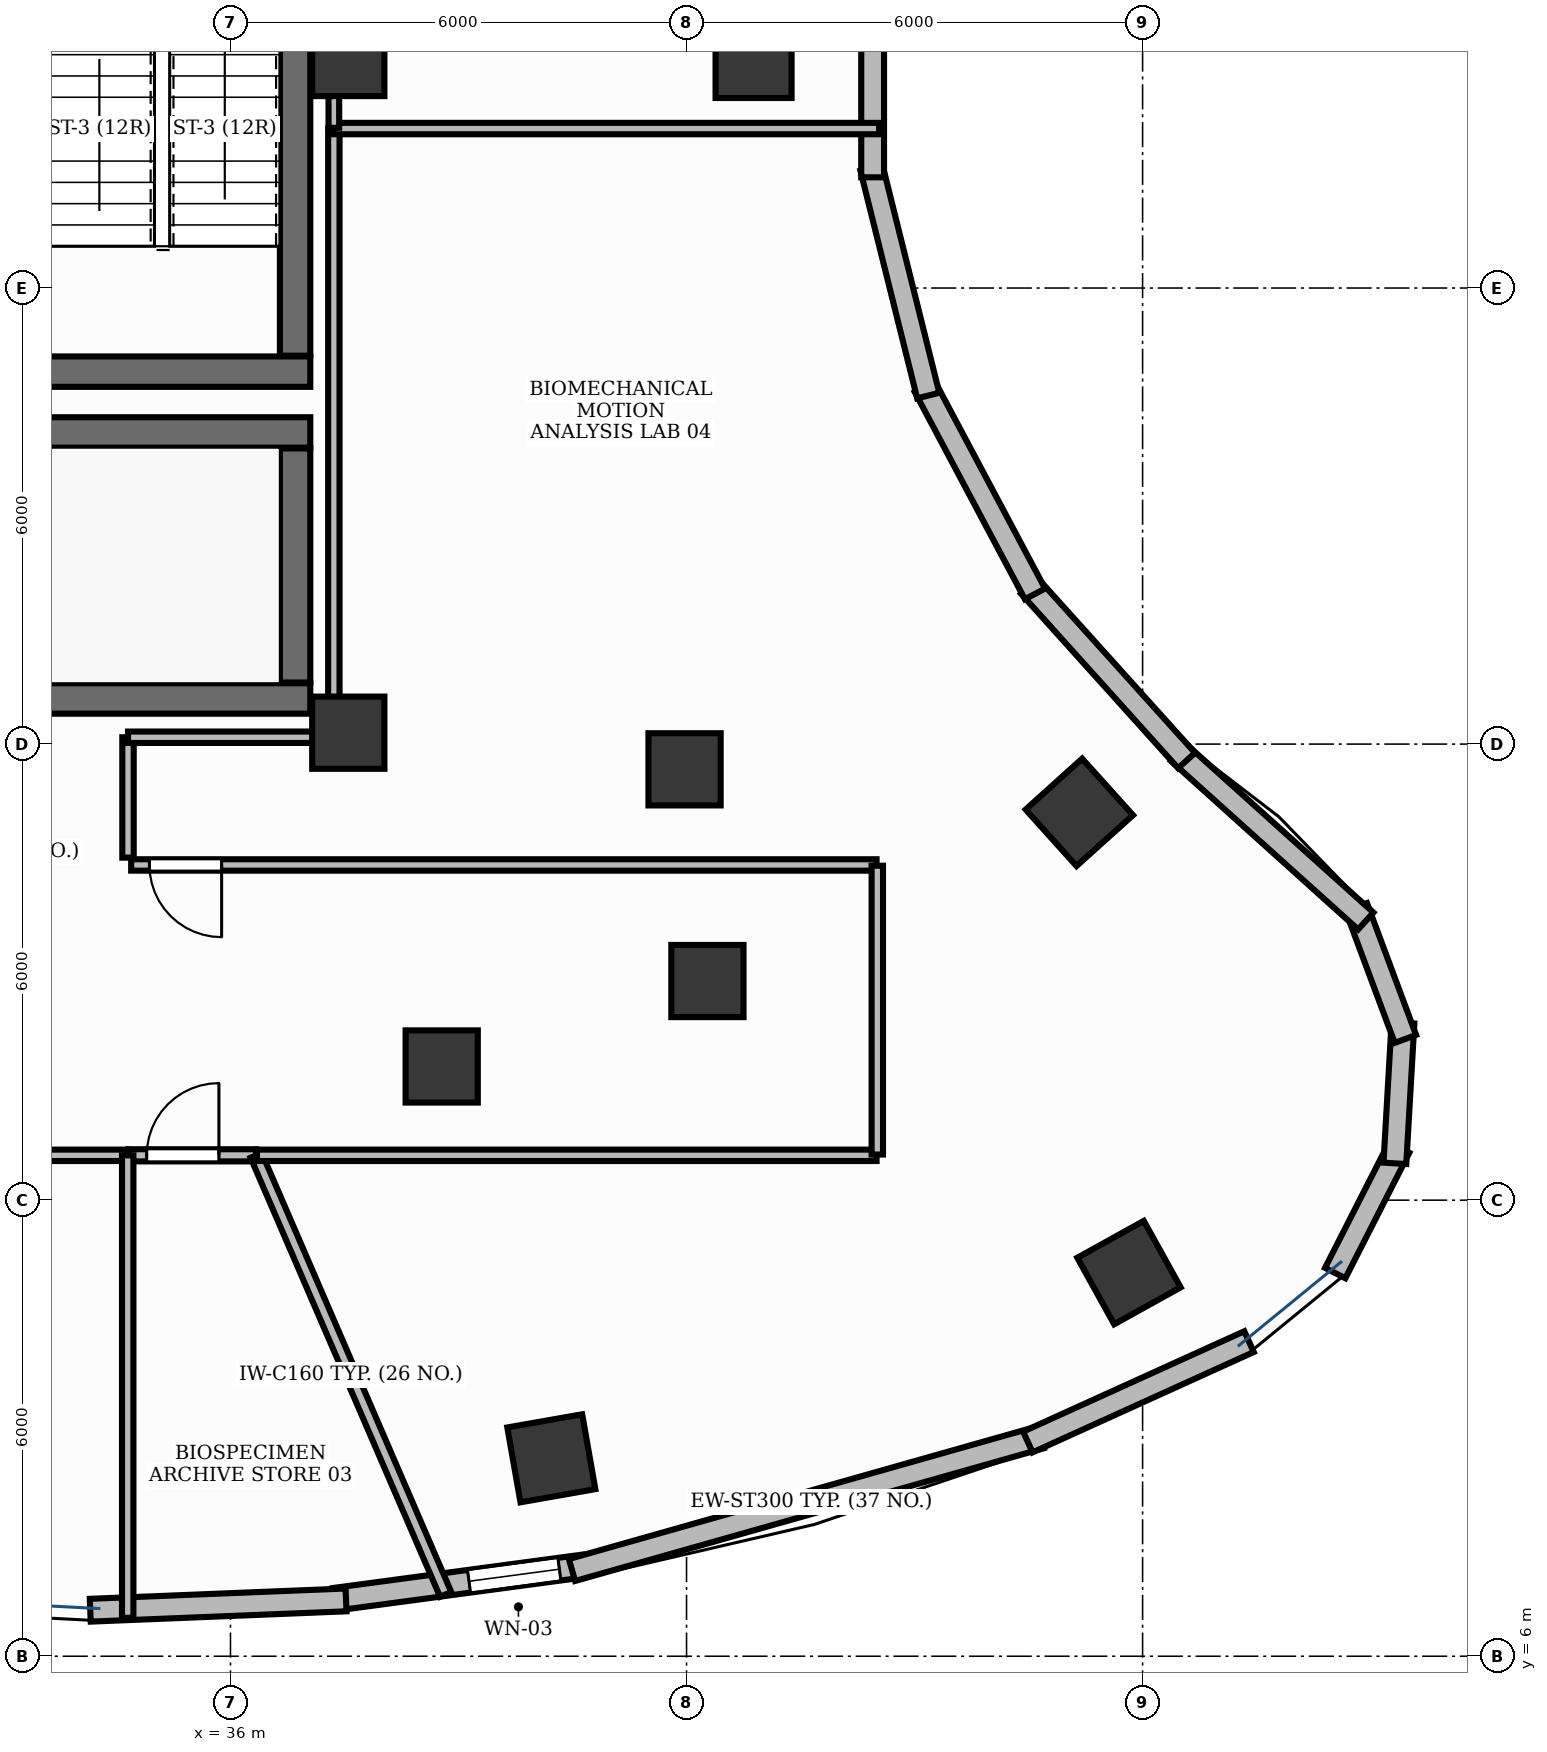
"""IFC4 building model, lengths in metres.
Left out: names, types, materials, properties, quantities, classifications, styles, units other than length and angle.
Written with IfcOpenShell. Run it as: python <this file> out.ifc"""

import sys

from ifc_helpers import new_model, si_unit, direction, frame, frame_2d, origin, origin_2d, place, context, subcontext, project, spatial, rectangle, extrude, element, fill, save


model = new_model("IFC4")
c1 = context("Model", 3, precision=1e-05, world=origin(), true_north=direction((0.0, 1.0)))
c2 = subcontext(c1, "Body", "Model", "MODEL_VIEW")
j1 = project(units=[si_unit("LENGTHUNIT", "METRE"), si_unit("PLANEANGLEUNIT", "RADIAN")], contexts=[c1])
p1 = place(None, origin())
s1 = spatial("IfcSite", under=j1, at=p1, CompositionType="ELEMENT")
p2 = place(p1, origin())
s2 = spatial("IfcBuilding", under=s1, at=p2, CompositionType="ELEMENT")
p3 = place(p2, frame((0.0, 0.0, 171.0)))
s3 = spatial("IfcBuildingStorey", under=s2, at=p3, CompositionType="ELEMENT", Elevation=171.0)
p4 = place(p3, frame((28.852, 18.6, 0.0), z_axis=(0.0, 0.0, 1.0), x_axis=(1.0, 0.0, 0.0)))
e1 = element("IfcWall", 1, at=p4, inside=s3, PredefinedType="SHEAR", context=c2, shape_type="SweptSolid", body=[
    extrude(rectangle(XDim=8.198, YDim=0.4, at=frame_2d((4.099, 0.0))), origin(), (0.0, 0.0, 1.0), 3.9),
])
p5 = place(p3, frame((28.4, 22.1, 0.0), z_axis=(0.0, 0.0, 1.0), x_axis=(1.0, 0.0, 0.0)))
e2 = element("IfcWall", 2, at=p5, inside=s3, PredefinedType="SHEAR", context=c2, shape_type="SweptSolid", body=[
    extrude(rectangle(XDim=8.65, YDim=0.4, at=frame_2d((4.325, 0.0))), origin(), (0.0, 0.0, 1.0), 3.9),
])
p6 = place(p3, frame((36.85, 18.81, 0.0), z_axis=(0.0, 0.0, 1.0), x_axis=(0.0, 1.0, 0.0)))
e3 = element("IfcWall", 3, at=p6, inside=s3, PredefinedType="SHEAR", context=c2, shape_type="SweptSolid", body=[
    extrude(rectangle(XDim=3.08, YDim=0.4, at=frame_2d((1.54, 0.0))), origin(), (0.0, 0.0, 1.0), 3.9),
])
p7 = place(p3, frame((33.15, 22.9, 0.0), z_axis=(0.0, 0.0, 1.0), x_axis=(1.0, 0.0, 0.0)))
e4 = element("IfcWall", 4, at=p7, inside=s3, PredefinedType="SHEAR", context=c2, shape_type="SweptSolid", body=[
    extrude(rectangle(XDim=3.9, YDim=0.4, at=frame_2d((1.95, 0.0))), origin(), (0.0, 0.0, 1.0), 3.9),
])
p8 = place(p3, frame((36.85, 23.11, 0.0), z_axis=(0.0, 0.0, 1.0), x_axis=(0.0, 1.0, 0.0)))
e5 = element("IfcWall", 5, at=p8, inside=s3, PredefinedType="SHEAR", context=c2, shape_type="SweptSolid", body=[
    extrude(rectangle(XDim=7.78, YDim=0.4, at=frame_2d((3.89, 0.0))), origin(), (0.0, 0.0, 1.0), 3.9),
])
for number, where, z_axis, x_axis in (
    (6, (37.55, 18.15, -0.0), (0.0, 0.0, 1.0), (1.0, 0.0, 0.0)),
    (7, (37.55, 27.0, -0.0), (0.0, 0.0, 1.0), (1.0, 0.0, 0.0)),
):
    element("IfcColumn", number, at=place(p3, frame(where, z_axis=z_axis, x_axis=x_axis)), inside=s3, PredefinedType="PILASTER", context=c2, shape_type="SweptSolid", body=[
        extrude(rectangle(XDim=0.95, YDim=0.95, at=origin_2d()), origin(), (0.0, 0.0, 1.0), 3.901),
    ])
p9 = place(p3, frame((40.221, 8.604, -0.0), z_axis=(0.0, 0.0, 1.0), x_axis=(0.984868307662, 0.173304404339, 0.0)))
e8 = element("IfcColumn", 8, at=p9, inside=s3, PredefinedType="COLUMN", context=c2, shape_type="SweptSolid", body=[
    extrude(rectangle(XDim=1.0, YDim=1.0, at=origin_2d()), origin(), (0.0, 0.0, 1.0), 3.901),
])
p10 = place(p3, frame((38.779, 13.759, -0.0), z_axis=(0.0, 0.0, 1.0), x_axis=(1.0, 0.0, 0.0)))
e9 = element("IfcColumn", 9, at=p10, inside=s3, PredefinedType="COLUMN", context=c2, shape_type="SweptSolid", body=[
    extrude(rectangle(XDim=0.95, YDim=0.95, at=origin_2d()), origin(), (0.0, 0.0, 1.0), 3.901),
])
p11 = place(p3, frame((47.821, 11.047, -0.0), z_axis=(0.0, 0.0, 1.0), x_axis=(0.874535078577, 0.484962262797, 0.0)))
e10 = element("IfcColumn", 10, at=p11, inside=s3, PredefinedType="COLUMN", context=c2, shape_type="SweptSolid", body=[
    extrude(rectangle(XDim=1.0, YDim=1.0, at=origin_2d()), origin(), (0.0, 0.0, 1.0), 3.901),
])
p12 = place(p3, frame((42.275, 14.883, -0.0), z_axis=(0.0, 0.0, 1.0), x_axis=(1.0, 0.0, 0.0)))
e11 = element("IfcColumn", 11, at=p12, inside=s3, PredefinedType="COLUMN", context=c2, shape_type="SweptSolid", body=[
    extrude(rectangle(XDim=0.95, YDim=0.95, at=origin_2d()), origin(), (0.0, 0.0, 1.0), 3.901),
])
p13 = place(p3, frame((47.167, 17.102, -0.0), z_axis=(0.0, 0.0, 1.0), x_axis=(-0.669130606359, 0.743144825477, 0.0)))
e12 = element("IfcColumn", 12, at=p13, inside=s3, PredefinedType="COLUMN", context=c2, shape_type="SweptSolid", body=[
    extrude(rectangle(XDim=1.0, YDim=1.0, at=origin_2d()), origin(), (0.0, 0.0, 1.0), 3.901),
])
p14 = place(p3, frame((41.974, 17.668, -0.0), z_axis=(0.0, 0.0, 1.0), x_axis=(1.0, 0.0, 0.0)))
e13 = element("IfcColumn", 13, at=p14, inside=s3, PredefinedType="COLUMN", context=c2, shape_type="SweptSolid", body=[
    extrude(rectangle(XDim=0.95, YDim=0.95, at=origin_2d()), origin(), (0.0, 0.0, 1.0), 3.901),
])
p15 = place(p3, frame((42.882, 27.0, -0.0), z_axis=(0.0, 0.0, 1.0), x_axis=(0.0, 1.0, 0.0)))
e14 = element("IfcColumn", 14, at=p15, inside=s3, PredefinedType="COLUMN", context=c2, shape_type="SweptSolid", body=[
    extrude(rectangle(XDim=1.0, YDim=1.0, at=origin_2d()), origin(), (0.0, 0.0, 1.0), 3.901),
])
p16 = place(p3, frame((37.365, 6.748, 0.0), z_axis=(0.0, 0.0, 1.0), x_axis=(0.991139436205, 0.132825517122, 0.0)))
e15 = element("IfcWall", 15, at=p16, inside=s3, PredefinedType="STANDARD", context=c2, shape_type="SweptSolid", body=[
    extrude(rectangle(XDim=3.31, YDim=0.3, at=frame_2d((1.655, 0.0))), origin(), (0.0, 0.0, 1.0), 3.9),
])
p17 = place(p16, frame((1.789, 0.0, 0.9)))
e16 = element("IfcOpeningElement", 16, at=p17, cuts=e15, PredefinedType="OPENING", context=c2, shape_type="SweptSolid", body=[
    extrude(rectangle(XDim=1.2, YDim=2.7, at=frame_2d((0.6, 1.35))), frame((0.0, 0.165, 0.0), z_axis=(0.0, -1.0, 0.0), x_axis=(1.0, 0.0, 0.0)), (0.0, 0.0, 1.0), 0.33),
])
p18 = place(p3, frame((34.155, 6.605, 0.0), z_axis=(0.0, 0.0, 1.0), x_axis=(0.999190386434, 0.040231475948, 0.0)))
e17 = element("IfcWall", 17, at=p18, inside=s3, PredefinedType="STANDARD", context=c2, shape_type="SweptSolid", body=[
    extrude(rectangle(XDim=3.368, YDim=0.3, at=frame_2d((1.684, 0.0))), origin(), (0.0, 0.0, 1.0), 3.9),
])
p19 = place(p3, frame((40.493, 7.134, 0.0), z_axis=(0.0, 0.0, 1.0), x_axis=(0.962163849422, 0.272471515694, 0.0)))
e18 = element("IfcWall", 18, at=p19, inside=s3, PredefinedType="STANDARD", context=c2, shape_type="SweptSolid", body=[
    extrude(rectangle(XDim=6.409, YDim=0.3, at=frame_2d((3.205, 0.0))), origin(), (0.0, 0.0, 1.0), 3.9),
])
p20 = place(p3, frame((46.49, 8.818, 0.0), z_axis=(0.0, 0.0, 1.0), x_axis=(0.910633193525, 0.413215666268, 0.0)))
e19 = element("IfcWall", 19, at=p20, inside=s3, PredefinedType="STANDARD", context=c2, shape_type="SweptSolid", body=[
    extrude(rectangle(XDim=3.195, YDim=0.3, at=frame_2d((1.598, 0.0))), origin(), (0.0, 0.0, 1.0), 3.9),
])
for number, where, z_axis, x_axis in (
    (20, (50.534, 11.041, 0.0), (0.0, 0.0, 1.0), (0.454, 0.891, 0.0)),
    (21, (51.319, 12.484, 0.0), (0.0, 0.0, 1.0), (0.057, 0.998, 0.0)),
    (22, (51.458, 14.121, 0.0), (0.0, 0.0, 1.0), (-0.349, 0.937, 0.0)),
):
    element("IfcWall", number, at=place(p3, frame(where, z_axis=z_axis, x_axis=x_axis)), inside=s3, PredefinedType="STANDARD", context=c2, shape_type="SweptSolid", body=[
        extrude(rectangle(XDim=1.852, YDim=0.3, at=frame_2d((0.926, 0.0))), origin(), (0.0, 0.0, 1.0), 3.9),
    ])
p21 = place(p3, frame((50.936, 15.673, 0.0), z_axis=(0.0, 0.0, 1.0), x_axis=(-0.743341827472, 0.668911748687, 0.0)))
e23 = element("IfcWall", 23, at=p21, inside=s3, PredefinedType="STANDARD", context=c2, shape_type="SweptSolid", body=[
    extrude(rectangle(XDim=3.31, YDim=0.3, at=frame_2d((1.655, 0.0))), origin(), (0.0, 0.0, 1.0), 3.9),
])
for number, where, z_axis, x_axis in (
    (24, (48.579, 17.784, 0.0), (0.0, 0.0, 1.0), (-0.669, 0.743, 0.0)),
    (25, (46.584, 19.976, 0.0), (0.0, 0.0, 1.0), (-0.469, 0.883, 0.0)),
    (26, (45.18, 22.585, 0.0), (0.0, 0.0, 1.0), (-0.242, 0.97, 0.0)),
    (27, (44.448, 25.457, 0.0), (0.0, 0.0, 1.0), (0.0, 1.0, 0.0)),
):
    element("IfcWall", number, at=place(p3, frame(where, z_axis=z_axis, x_axis=x_axis)), inside=s3, PredefinedType="STANDARD", context=c2, shape_type="SweptSolid", body=[
        extrude(rectangle(XDim=3.087, YDim=0.3, at=frame_2d((1.543, 0.0))), origin(), (0.0, 0.0, 1.0), 3.9),
    ])
p22 = place(p3, frame((19.85, 12.59, 0.0), z_axis=(0.0, 0.0, 1.0), x_axis=(1.0, 0.0, 0.0)))
e28 = element("IfcWall", 28, at=p22, inside=s3, PredefinedType="PARTITIONING", context=c2, shape_type="SweptSolid", body=[
    extrude(rectangle(XDim=14.798, YDim=0.15, at=frame_2d((7.399, 0.0))), origin(), (0.0, 0.0, 1.0), 2.91),
])
p23 = place(p22, frame((4.809, 0.0, 0.0)))
e29 = element("IfcOpeningElement", 29, at=p23, cuts=e28, PredefinedType="OPENING", context=c2, shape_type="SweptSolid", body=[
    extrude(rectangle(XDim=0.95, YDim=2.15, at=frame_2d((0.475, 1.075))), frame((0.0, 0.09, 0.0), z_axis=(0.0, -1.0, 0.0), x_axis=(1.0, 0.0, 0.0)), (0.0, 0.0, 1.0), 0.18),
])
p24 = place(p3, frame((34.658, 12.59, 0.0), z_axis=(0.0, 0.0, 1.0), x_axis=(1.0, 0.0, 0.0)))
e30 = element("IfcWall", 30, at=p24, inside=s3, PredefinedType="PARTITIONING", context=c2, shape_type="SweptSolid", body=[
    extrude(rectangle(XDim=1.68, YDim=0.16, at=frame_2d((0.84, 0.0))), origin(), (0.0, 0.0, 1.0), 2.91),
])
p25 = place(p24, frame((0.24, 0.0, 0.0)))
e31 = element("IfcOpeningElement", 31, at=p25, cuts=e30, PredefinedType="OPENING", context=c2, shape_type="SweptSolid", body=[
    extrude(rectangle(XDim=0.95, YDim=2.15, at=frame_2d((0.475, 1.075))), frame((0.0, 0.095, 0.0), z_axis=(0.0, -1.0, 0.0), x_axis=(1.0, 0.0, 0.0)), (0.0, 0.0, 1.0), 0.19),
])
p26 = place(p3, frame((44.5, 16.41, 0.0), z_axis=(0.0, 0.0, 1.0), x_axis=(-1.0, 0.0, 0.0)))
e32 = element("IfcWall", 32, at=p26, inside=s3, PredefinedType="PARTITIONING", context=c2, shape_type="SweptSolid", body=[
    extrude(rectangle(XDim=9.806, YDim=0.15, at=frame_2d((4.903, 0.0))), origin(), (0.0, 0.0, 1.0), 2.91),
])
p27 = place(p26, frame((8.616, 0.0, 0.0)))
e33 = element("IfcOpeningElement", 33, at=p27, cuts=e32, PredefinedType="OPENING", context=c2, shape_type="SweptSolid", body=[
    extrude(rectangle(XDim=0.95, YDim=2.15, at=frame_2d((0.475, 1.075))), frame((0.0, 0.09, 0.0), z_axis=(0.0, -1.0, 0.0), x_axis=(1.0, 0.0, 0.0)), (0.0, 0.0, 1.0), 0.18),
])
p28 = place(p3, frame((34.648, 12.59, 0.0), z_axis=(0.0, 0.0, 1.0), x_axis=(0.0, -1.0, 0.0)))
e34 = element("IfcWall", 34, at=p28, inside=s3, PredefinedType="PARTITIONING", context=c2, shape_type="SweptSolid", body=[
    extrude(rectangle(XDim=6.085, YDim=0.15, at=frame_2d((3.042, 0.0))), origin(), (0.0, 0.0, 1.0), 2.91),
])
p29 = place(p3, frame((36.338, 12.59, 0.0), z_axis=(0.0, 0.0, 1.0), x_axis=(0.396278424629, -0.918130388438, 0.0)))
e35 = element("IfcWall", 35, at=p29, inside=s3, PredefinedType="PARTITIONING", context=c2, shape_type="SweptSolid", body=[
    extrude(rectangle(XDim=6.292, YDim=0.16, at=frame_2d((3.146, 0.0))), origin(), (0.0, 0.0, 1.0), 2.91),
])
p30 = place(p3, frame((36.349, 12.59, 0.0), z_axis=(0.0, 0.0, 1.0), x_axis=(1.0, 0.0, 0.0)))
e36 = element("IfcWall", 36, at=p30, inside=s3, PredefinedType="PARTITIONING", context=c2, shape_type="SweptSolid", body=[
    extrude(rectangle(XDim=8.151, YDim=0.15, at=frame_2d((4.076, 0.0))), origin(), (0.0, 0.0, 1.0), 2.91),
])
p31 = place(p3, frame((44.51, 12.6, 0.0), z_axis=(0.0, 0.0, 1.0), x_axis=(0.0, 1.0, 0.0)))
e37 = element("IfcWall", 37, at=p31, inside=s3, PredefinedType="PARTITIONING", context=c2, shape_type="SweptSolid", body=[
    extrude(rectangle(XDim=3.8, YDim=0.15, at=frame_2d((1.9, 0.0))), origin(), (0.0, 0.0, 1.0), 2.91),
])
p32 = place(p3, frame((34.652, 16.506, 0.0), z_axis=(0.0, 0.0, 1.0), x_axis=(0.0, 1.0, 0.0)))
e38 = element("IfcWall", 38, at=p32, inside=s3, PredefinedType="PARTITIONING", context=c2, shape_type="SweptSolid", body=[
    extrude(rectangle(XDim=1.584, YDim=0.15, at=frame_2d((0.792, 0.0))), origin(), (0.0, 0.0, 1.0), 2.91),
])
p33 = place(p3, frame((34.652, 18.09, 0.0), z_axis=(0.0, 0.0, 1.0), x_axis=(1.0, 0.0, 0.0)))
e39 = element("IfcWall", 39, at=p33, inside=s3, PredefinedType="PARTITIONING", context=c2, shape_type="SweptSolid", body=[
    extrude(rectangle(XDim=2.698, YDim=0.15, at=frame_2d((1.349, 0.0))), origin(), (0.0, 0.0, 1.0), 2.91),
])
p34 = place(p3, frame((37.36, 18.1, 0.0), z_axis=(0.0, 0.0, 1.0), x_axis=(0.0, 1.0, 0.0)))
e40 = element("IfcWall", 40, at=p34, inside=s3, PredefinedType="PARTITIONING", context=c2, shape_type="SweptSolid", body=[
    extrude(rectangle(XDim=7.998, YDim=0.15, at=frame_2d((3.999, 0.0))), origin(), (0.0, 0.0, 1.0), 2.91),
])
p35 = place(p3, frame((37.36, 26.098, 0.0), z_axis=(0.0, 0.0, 1.0), x_axis=(1.0, 0.0, 0.0)))
e41 = element("IfcWall", 41, at=p35, inside=s3, PredefinedType="PARTITIONING", context=c2, shape_type="SweptSolid", body=[
    extrude(rectangle(XDim=7.173, YDim=0.15, at=frame_2d((3.587, 0.0))), origin(), (0.0, 0.0, 1.0), 2.91),
])
p36 = place(p3, frame((37.36, 26.108, 0.0), z_axis=(0.0, 0.0, 1.0), x_axis=(0.0, 1.0, 0.0)))
e42 = element("IfcWall", 42, at=p36, inside=s3, PredefinedType="PARTITIONING", context=c2, shape_type="SweptSolid", body=[
    extrude(rectangle(XDim=9.792, YDim=0.14, at=frame_2d((4.896, 0.0))), origin(), (0.0, 0.0, 1.0), 2.91),
])
p37 = place(p17, origin())
e43 = element("IfcWindow", 43, at=p37, inside=s3, PartitioningType="SINGLE_PANEL", PredefinedType="WINDOW", context=c2, shape_type="SweptSolid", body=[
    extrude(rectangle(XDim=1.2, YDim=2.7, at=frame_2d((0.6, 1.35))), frame((0.0, 0.03, 0.0), z_axis=(0.0, -1.0, 0.0), x_axis=(1.0, 0.0, 0.0)), (0.0, 0.0, 1.0), 0.06),
])
fill(e16, e43)
p38 = place(p25, origin())
e44 = element("IfcDoor", 44, at=p38, inside=s3, OperationType="SINGLE_SWING_RIGHT", PredefinedType="DOOR", context=c2, shape_type="SweptSolid", body=[
    extrude(rectangle(XDim=0.95, YDim=2.15, at=frame_2d((0.475, 1.075))), frame((0.0, 0.025, 0.0), z_axis=(0.0, -1.0, 0.0), x_axis=(1.0, 0.0, 0.0)), (0.0, 0.0, 1.0), 0.05),
])
fill(e31, e44)
p39 = place(p27, origin())
e45 = element("IfcDoor", 45, at=p39, inside=s3, OperationType="SINGLE_SWING_LEFT", PredefinedType="DOOR", context=c2, shape_type="SweptSolid", body=[
    extrude(rectangle(XDim=0.95, YDim=2.15, at=frame_2d((0.475, 1.075))), frame((0.0, 0.025, 0.0), z_axis=(0.0, -1.0, 0.0), x_axis=(1.0, 0.0, 0.0)), (0.0, 0.0, 1.0), 0.05),
])
fill(e33, e45)
save(model, sys.argv[1])
